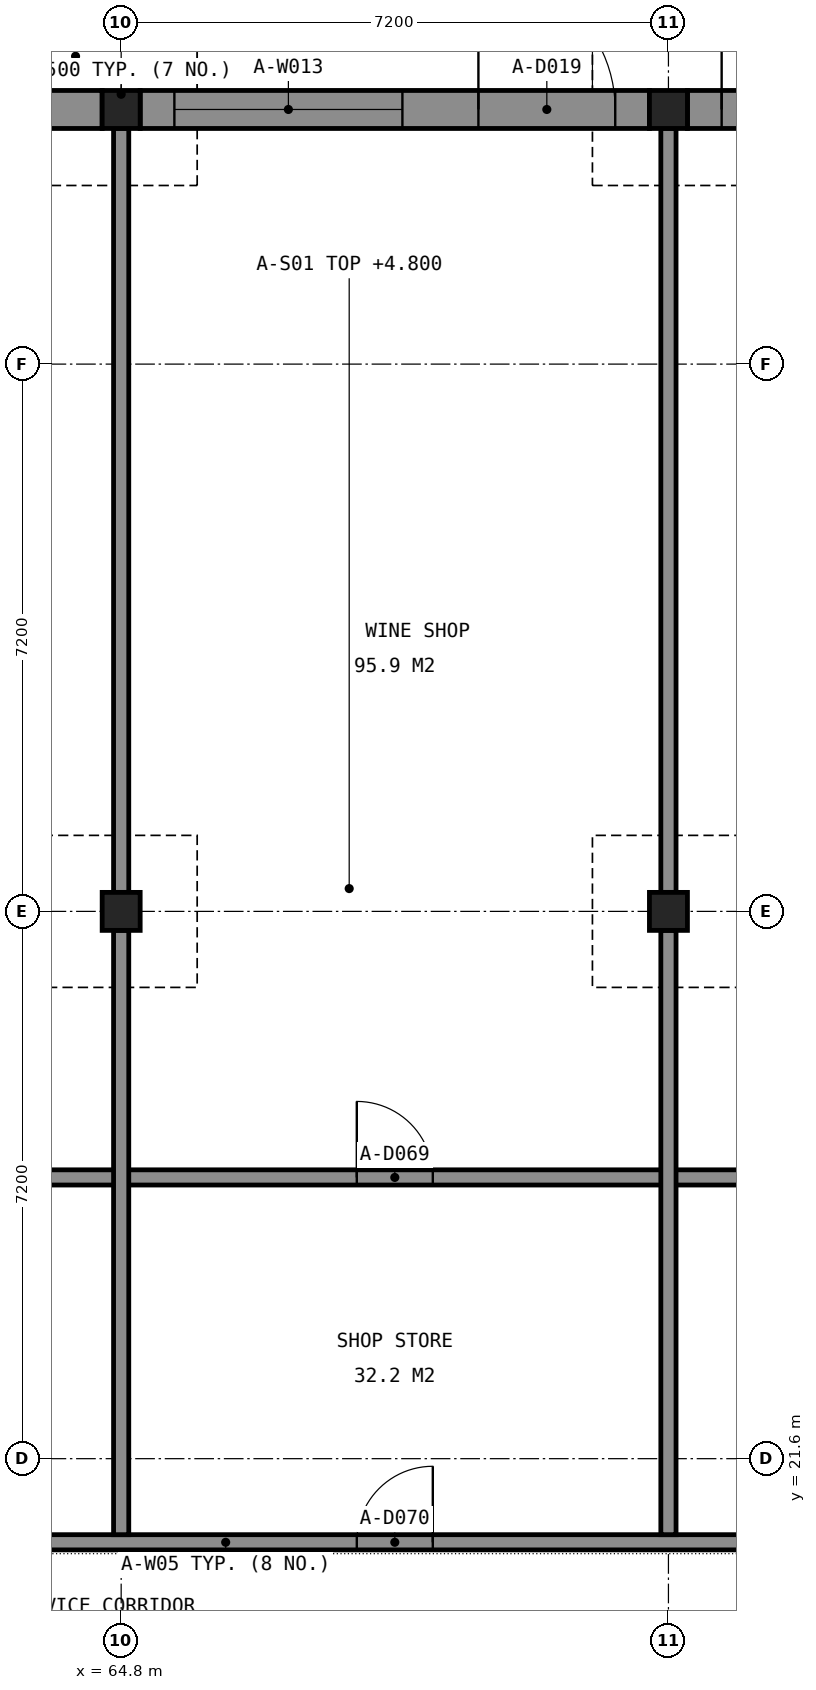
"""IFC4 building model, lengths in metres.
Left out: names, types, materials, properties, quantities, classifications, styles, units other than length and angle.
Written with IfcOpenShell. Run it as: python <this file> out.ifc"""

import sys

from ifc_helpers import new_model, si_unit, direction, frame, frame_2d, origin, origin_2d, place, context, subcontext, project, spatial, rectangle, extrude, element, fill, save


model = new_model("IFC4")
c1 = context("Model", 3, precision=1e-05, world=origin(), true_north=direction((0.0, 1.0)))
c2 = subcontext(c1, "Body", "Model", "MODEL_VIEW")
j1 = project(units=[si_unit("LENGTHUNIT", "METRE"), si_unit("PLANEANGLEUNIT", "RADIAN")], contexts=[c1])
p1 = place(None, origin())
s1 = spatial("IfcSite", under=j1, at=p1, CompositionType="ELEMENT")
p2 = place(p1, origin())
s2 = spatial("IfcBuilding", under=s1, at=p2, CompositionType="ELEMENT")
p3 = place(p2, origin())
s3 = spatial("IfcBuildingStorey", under=s2, at=p3, CompositionType="ELEMENT", Elevation=0.0)
for number, where, z_axis, x_axis in (
    (1, (64.8, 39.35, 0.0), (0.0, 0.0, 1.0), (1.0, 0.0, 0.0)),
    (2, (72.0, 39.35, 0.0), (0.0, 0.0, 1.0), (1.0, 0.0, 0.0)),
    (3, (64.8, 28.8, 0.0), (0.0, 0.0, 1.0), (1.0, 0.0, 0.0)),
    (4, (72.0, 28.8, 0.0), (0.0, 0.0, 1.0), (1.0, 0.0, 0.0)),
):
    element("IfcColumn", number, at=place(p3, frame(where, z_axis=z_axis, x_axis=x_axis)), inside=s3, PredefinedType="COLUMN", context=c2, shape_type="SweptSolid", body=[
        extrude(rectangle(XDim=0.5, YDim=0.5, at=origin_2d()), origin(), (0.0, 0.0, 1.0), 3.7),
    ])
p4 = place(p3, frame((57.85, 39.35, 0.0), z_axis=(0.0, 0.0, 1.0), x_axis=(1.0, 0.0, 0.0)))
e5 = element("IfcWall", 5, at=p4, inside=s3, PredefinedType="SOLIDWALL", context=c2, shape_type="SweptSolid", body=[
    extrude(rectangle(XDim=6.7, YDim=0.5, at=frame_2d((3.35, 0.0))), origin(), (0.0, 0.0, 1.0), 3.6),
])
p5 = place(p4, frame((0.45, 0.0, 0.0)))
e6 = element("IfcOpeningElement", 6, at=p5, cuts=e5, PredefinedType="OPENING", context=c2, shape_type="SweptSolid", body=[
    extrude(rectangle(XDim=1.8, YDim=2.4, at=frame_2d((0.9, 1.2))), frame((0.0, 0.26, 0.0), z_axis=(0.0, -1.0, 0.0), x_axis=(1.0, 0.0, 0.0)), (0.0, 0.0, 1.0), 0.52),
])
p6 = place(p4, frame((2.6, 0.0, 0.6)))
e7 = element("IfcOpeningElement", 7, at=p6, cuts=e5, PredefinedType="OPENING", context=c2, shape_type="SweptSolid", body=[
    extrude(rectangle(XDim=3.0, YDim=2.4, at=frame_2d((1.5, 1.2))), frame((0.0, 0.26, 0.0), z_axis=(0.0, -1.0, 0.0), x_axis=(1.0, 0.0, 0.0)), (0.0, 0.0, 1.0), 0.52),
])
p7 = place(p3, frame((65.05, 39.35, 0.0), z_axis=(0.0, 0.0, 1.0), x_axis=(1.0, 0.0, 0.0)))
e8 = element("IfcWall", 8, at=p7, inside=s3, PredefinedType="SOLIDWALL", context=c2, shape_type="SweptSolid", body=[
    extrude(rectangle(XDim=6.7, YDim=0.5, at=frame_2d((3.35, 0.0))), origin(), (0.0, 0.0, 1.0), 3.6),
])
p8 = place(p7, frame((4.45, 0.0, 0.0)))
e9 = element("IfcOpeningElement", 9, at=p8, cuts=e8, PredefinedType="OPENING", context=c2, shape_type="SweptSolid", body=[
    extrude(rectangle(XDim=1.8, YDim=2.4, at=frame_2d((0.9, 1.2))), frame((0.0, 0.26, 0.0), z_axis=(0.0, -1.0, 0.0), x_axis=(1.0, 0.0, 0.0)), (0.0, 0.0, 1.0), 0.52),
])
p9 = place(p7, frame((0.45, 0.0, 0.6)))
e10 = element("IfcOpeningElement", 10, at=p9, cuts=e8, PredefinedType="OPENING", context=c2, shape_type="SweptSolid", body=[
    extrude(rectangle(XDim=3.0, YDim=2.4, at=frame_2d((1.5, 1.2))), frame((0.0, 0.26, 0.0), z_axis=(0.0, -1.0, 0.0), x_axis=(1.0, 0.0, 0.0)), (0.0, 0.0, 1.0), 0.52),
])
p10 = place(p3, frame((72.25, 39.35, 0.0), z_axis=(0.0, 0.0, 1.0), x_axis=(1.0, 0.0, 0.0)))
e11 = element("IfcWall", 11, at=p10, inside=s3, PredefinedType="SOLIDWALL", context=c2, shape_type="SweptSolid", body=[
    extrude(rectangle(XDim=6.7, YDim=0.5, at=frame_2d((3.35, 0.0))), origin(), (0.0, 0.0, 1.0), 3.6),
])
p11 = place(p10, frame((0.45, 0.0, 0.0)))
e12 = element("IfcOpeningElement", 12, at=p11, cuts=e11, PredefinedType="OPENING", context=c2, shape_type="SweptSolid", body=[
    extrude(rectangle(XDim=1.8, YDim=2.4, at=frame_2d((0.9, 1.2))), frame((0.0, 0.26, 0.0), z_axis=(0.0, -1.0, 0.0), x_axis=(1.0, 0.0, 0.0)), (0.0, 0.0, 1.0), 0.52),
])
p12 = place(p10, frame((2.6, 0.0, 0.6)))
e13 = element("IfcOpeningElement", 13, at=p12, cuts=e11, PredefinedType="OPENING", context=c2, shape_type="SweptSolid", body=[
    extrude(rectangle(XDim=3.0, YDim=2.4, at=frame_2d((1.5, 1.2))), frame((0.0, 0.26, 0.0), z_axis=(0.0, -1.0, 0.0), x_axis=(1.0, 0.0, 0.0)), (0.0, 0.0, 1.0), 0.52),
])
p13 = place(p3, frame((54.35, 20.5, 0.0), z_axis=(0.0, 0.0, 1.0), x_axis=(1.0, 0.0, 0.0)))
e14 = element("IfcWall", 14, at=p13, inside=s3, PredefinedType="PARTITIONING", context=c2, shape_type="SweptSolid", body=[
    extrude(rectangle(XDim=92.9, YDim=0.2, at=frame_2d((46.45, 0.0))), origin(), (0.0, 0.0, 1.0), 3.5),
])
p14 = place(p13, frame((1.1, 0.0, 0.0)))
e15 = element("IfcOpeningElement", 15, at=p14, cuts=e14, PredefinedType="OPENING", context=c2, shape_type="SweptSolid", body=[
    extrude(rectangle(XDim=0.9, YDim=2.1, at=frame_2d((0.45, 1.05))), frame((0.0, 0.11, 0.0), z_axis=(0.0, -1.0, 0.0), x_axis=(1.0, 0.0, 0.0)), (0.0, 0.0, 1.0), 0.22),
])
p15 = place(p13, frame((90.9, 0.0, 0.0)))
e16 = element("IfcOpeningElement", 16, at=p15, cuts=e14, PredefinedType="OPENING", context=c2, shape_type="SweptSolid", body=[
    extrude(rectangle(XDim=0.9, YDim=2.1, at=frame_2d((0.45, 1.05))), frame((0.0, 0.11, 0.0), z_axis=(0.0, -1.0, 0.0), x_axis=(1.0, 0.0, 0.0)), (0.0, 0.0, 1.0), 0.22),
])
p16 = place(p13, frame((6.35, 0.0, 0.0)))
e17 = element("IfcOpeningElement", 17, at=p16, cuts=e14, PredefinedType="OPENING", context=c2, shape_type="SweptSolid", body=[
    extrude(rectangle(XDim=1.0, YDim=2.1, at=frame_2d((0.5, 1.05))), frame((0.0, 0.11, 0.0), z_axis=(0.0, -1.0, 0.0), x_axis=(1.0, 0.0, 0.0)), (0.0, 0.0, 1.0), 0.22),
])
p17 = place(p13, frame((13.55, 0.0, 0.0)))
e18 = element("IfcOpeningElement", 18, at=p17, cuts=e14, PredefinedType="OPENING", context=c2, shape_type="SweptSolid", body=[
    extrude(rectangle(XDim=1.0, YDim=2.1, at=frame_2d((0.5, 1.05))), frame((0.0, 0.11, 0.0), z_axis=(0.0, -1.0, 0.0), x_axis=(1.0, 0.0, 0.0)), (0.0, 0.0, 1.0), 0.22),
])
p18 = place(p13, frame((20.75, 0.0, 0.0)))
e19 = element("IfcOpeningElement", 19, at=p18, cuts=e14, PredefinedType="OPENING", context=c2, shape_type="SweptSolid", body=[
    extrude(rectangle(XDim=1.0, YDim=2.1, at=frame_2d((0.5, 1.05))), frame((0.0, 0.11, 0.0), z_axis=(0.0, -1.0, 0.0), x_axis=(1.0, 0.0, 0.0)), (0.0, 0.0, 1.0), 0.22),
])
p19 = place(p13, frame((27.95, 0.0, 0.0)))
e20 = element("IfcOpeningElement", 20, at=p19, cuts=e14, PredefinedType="OPENING", context=c2, shape_type="SweptSolid", body=[
    extrude(rectangle(XDim=1.0, YDim=2.1, at=frame_2d((0.5, 1.05))), frame((0.0, 0.11, 0.0), z_axis=(0.0, -1.0, 0.0), x_axis=(1.0, 0.0, 0.0)), (0.0, 0.0, 1.0), 0.22),
])
p20 = place(p13, frame((35.15, 0.0, 0.0)))
e21 = element("IfcOpeningElement", 21, at=p20, cuts=e14, PredefinedType="OPENING", context=c2, shape_type="SweptSolid", body=[
    extrude(rectangle(XDim=1.0, YDim=2.1, at=frame_2d((0.5, 1.05))), frame((0.0, 0.11, 0.0), z_axis=(0.0, -1.0, 0.0), x_axis=(1.0, 0.0, 0.0)), (0.0, 0.0, 1.0), 0.22),
])
p21 = place(p13, frame((42.35, 0.0, 0.0)))
e22 = element("IfcOpeningElement", 22, at=p21, cuts=e14, PredefinedType="OPENING", context=c2, shape_type="SweptSolid", body=[
    extrude(rectangle(XDim=1.0, YDim=2.1, at=frame_2d((0.5, 1.05))), frame((0.0, 0.11, 0.0), z_axis=(0.0, -1.0, 0.0), x_axis=(1.0, 0.0, 0.0)), (0.0, 0.0, 1.0), 0.22),
])
p22 = place(p13, frame((49.55, 0.0, 0.0)))
e23 = element("IfcOpeningElement", 23, at=p22, cuts=e14, PredefinedType="OPENING", context=c2, shape_type="SweptSolid", body=[
    extrude(rectangle(XDim=1.0, YDim=2.1, at=frame_2d((0.5, 1.05))), frame((0.0, 0.11, 0.0), z_axis=(0.0, -1.0, 0.0), x_axis=(1.0, 0.0, 0.0)), (0.0, 0.0, 1.0), 0.22),
])
p23 = place(p13, frame((56.75, 0.0, 0.0)))
e24 = element("IfcOpeningElement", 24, at=p23, cuts=e14, PredefinedType="OPENING", context=c2, shape_type="SweptSolid", body=[
    extrude(rectangle(XDim=1.0, YDim=2.1, at=frame_2d((0.5, 1.05))), frame((0.0, 0.11, 0.0), z_axis=(0.0, -1.0, 0.0), x_axis=(1.0, 0.0, 0.0)), (0.0, 0.0, 1.0), 0.22),
])
p24 = place(p13, frame((63.95, 0.0, 0.0)))
e25 = element("IfcOpeningElement", 25, at=p24, cuts=e14, PredefinedType="OPENING", context=c2, shape_type="SweptSolid", body=[
    extrude(rectangle(XDim=1.0, YDim=2.1, at=frame_2d((0.5, 1.05))), frame((0.0, 0.11, 0.0), z_axis=(0.0, -1.0, 0.0), x_axis=(1.0, 0.0, 0.0)), (0.0, 0.0, 1.0), 0.22),
])
p25 = place(p13, frame((71.15, 0.0, 0.0)))
e26 = element("IfcOpeningElement", 26, at=p25, cuts=e14, PredefinedType="OPENING", context=c2, shape_type="SweptSolid", body=[
    extrude(rectangle(XDim=1.0, YDim=2.1, at=frame_2d((0.5, 1.05))), frame((0.0, 0.11, 0.0), z_axis=(0.0, -1.0, 0.0), x_axis=(1.0, 0.0, 0.0)), (0.0, 0.0, 1.0), 0.22),
])
p26 = place(p13, frame((78.35, 0.0, 0.0)))
e27 = element("IfcOpeningElement", 27, at=p26, cuts=e14, PredefinedType="OPENING", context=c2, shape_type="SweptSolid", body=[
    extrude(rectangle(XDim=1.0, YDim=2.1, at=frame_2d((0.5, 1.05))), frame((0.0, 0.11, 0.0), z_axis=(0.0, -1.0, 0.0), x_axis=(1.0, 0.0, 0.0)), (0.0, 0.0, 1.0), 0.22),
])
p27 = place(p13, frame((85.55, 0.0, 0.0)))
e28 = element("IfcOpeningElement", 28, at=p27, cuts=e14, PredefinedType="OPENING", context=c2, shape_type="SweptSolid", body=[
    extrude(rectangle(XDim=1.0, YDim=2.1, at=frame_2d((0.5, 1.05))), frame((0.0, 0.11, 0.0), z_axis=(0.0, -1.0, 0.0), x_axis=(1.0, 0.0, 0.0)), (0.0, 0.0, 1.0), 0.22),
])
p28 = place(p3, frame((57.7, 25.3, 0.0), z_axis=(0.0, 0.0, 1.0), x_axis=(1.0, 0.0, 0.0)))
e29 = element("IfcWall", 29, at=p28, inside=s3, PredefinedType="PARTITIONING", context=c2, shape_type="SweptSolid", body=[
    extrude(rectangle(XDim=86.2, YDim=0.2, at=frame_2d((43.1, 0.0))), origin(), (0.0, 0.0, 1.0), 3.5),
])
p29 = place(p28, frame((3.0, 0.0, 0.0)))
e30 = element("IfcOpeningElement", 30, at=p29, cuts=e29, PredefinedType="OPENING", context=c2, shape_type="SweptSolid", body=[
    extrude(rectangle(XDim=1.0, YDim=2.1, at=frame_2d((0.5, 1.05))), frame((0.0, 0.11, 0.0), z_axis=(0.0, -1.0, 0.0), x_axis=(1.0, 0.0, 0.0)), (0.0, 0.0, 1.0), 0.22),
])
p30 = place(p28, frame((10.2, 0.0, 0.0)))
e31 = element("IfcOpeningElement", 31, at=p30, cuts=e29, PredefinedType="OPENING", context=c2, shape_type="SweptSolid", body=[
    extrude(rectangle(XDim=1.0, YDim=2.1, at=frame_2d((0.5, 1.05))), frame((0.0, 0.11, 0.0), z_axis=(0.0, -1.0, 0.0), x_axis=(1.0, 0.0, 0.0)), (0.0, 0.0, 1.0), 0.22),
])
p31 = place(p28, frame((17.4, 0.0, 0.0)))
e32 = element("IfcOpeningElement", 32, at=p31, cuts=e29, PredefinedType="OPENING", context=c2, shape_type="SweptSolid", body=[
    extrude(rectangle(XDim=1.0, YDim=2.1, at=frame_2d((0.5, 1.05))), frame((0.0, 0.11, 0.0), z_axis=(0.0, -1.0, 0.0), x_axis=(1.0, 0.0, 0.0)), (0.0, 0.0, 1.0), 0.22),
])
p32 = place(p28, frame((24.6, 0.0, 0.0)))
e33 = element("IfcOpeningElement", 33, at=p32, cuts=e29, PredefinedType="OPENING", context=c2, shape_type="SweptSolid", body=[
    extrude(rectangle(XDim=1.0, YDim=2.1, at=frame_2d((0.5, 1.05))), frame((0.0, 0.11, 0.0), z_axis=(0.0, -1.0, 0.0), x_axis=(1.0, 0.0, 0.0)), (0.0, 0.0, 1.0), 0.22),
])
p33 = place(p28, frame((31.8, 0.0, 0.0)))
e34 = element("IfcOpeningElement", 34, at=p33, cuts=e29, PredefinedType="OPENING", context=c2, shape_type="SweptSolid", body=[
    extrude(rectangle(XDim=1.0, YDim=2.1, at=frame_2d((0.5, 1.05))), frame((0.0, 0.11, 0.0), z_axis=(0.0, -1.0, 0.0), x_axis=(1.0, 0.0, 0.0)), (0.0, 0.0, 1.0), 0.22),
])
p34 = place(p28, frame((39.0, 0.0, 0.0)))
e35 = element("IfcOpeningElement", 35, at=p34, cuts=e29, PredefinedType="OPENING", context=c2, shape_type="SweptSolid", body=[
    extrude(rectangle(XDim=1.0, YDim=2.1, at=frame_2d((0.5, 1.05))), frame((0.0, 0.11, 0.0), z_axis=(0.0, -1.0, 0.0), x_axis=(1.0, 0.0, 0.0)), (0.0, 0.0, 1.0), 0.22),
])
p35 = place(p28, frame((46.2, 0.0, 0.0)))
e36 = element("IfcOpeningElement", 36, at=p35, cuts=e29, PredefinedType="OPENING", context=c2, shape_type="SweptSolid", body=[
    extrude(rectangle(XDim=1.0, YDim=2.1, at=frame_2d((0.5, 1.05))), frame((0.0, 0.11, 0.0), z_axis=(0.0, -1.0, 0.0), x_axis=(1.0, 0.0, 0.0)), (0.0, 0.0, 1.0), 0.22),
])
p36 = place(p28, frame((53.4, 0.0, 0.0)))
e37 = element("IfcOpeningElement", 37, at=p36, cuts=e29, PredefinedType="OPENING", context=c2, shape_type="SweptSolid", body=[
    extrude(rectangle(XDim=1.0, YDim=2.1, at=frame_2d((0.5, 1.05))), frame((0.0, 0.11, 0.0), z_axis=(0.0, -1.0, 0.0), x_axis=(1.0, 0.0, 0.0)), (0.0, 0.0, 1.0), 0.22),
])
p37 = place(p28, frame((60.6, 0.0, 0.0)))
e38 = element("IfcOpeningElement", 38, at=p37, cuts=e29, PredefinedType="OPENING", context=c2, shape_type="SweptSolid", body=[
    extrude(rectangle(XDim=1.0, YDim=2.1, at=frame_2d((0.5, 1.05))), frame((0.0, 0.11, 0.0), z_axis=(0.0, -1.0, 0.0), x_axis=(1.0, 0.0, 0.0)), (0.0, 0.0, 1.0), 0.22),
])
p38 = place(p28, frame((67.8, 0.0, 0.0)))
e39 = element("IfcOpeningElement", 39, at=p38, cuts=e29, PredefinedType="OPENING", context=c2, shape_type="SweptSolid", body=[
    extrude(rectangle(XDim=1.0, YDim=2.1, at=frame_2d((0.5, 1.05))), frame((0.0, 0.11, 0.0), z_axis=(0.0, -1.0, 0.0), x_axis=(1.0, 0.0, 0.0)), (0.0, 0.0, 1.0), 0.22),
])
p39 = place(p28, frame((75.0, 0.0, 0.0)))
e40 = element("IfcOpeningElement", 40, at=p39, cuts=e29, PredefinedType="OPENING", context=c2, shape_type="SweptSolid", body=[
    extrude(rectangle(XDim=1.0, YDim=2.1, at=frame_2d((0.5, 1.05))), frame((0.0, 0.11, 0.0), z_axis=(0.0, -1.0, 0.0), x_axis=(1.0, 0.0, 0.0)), (0.0, 0.0, 1.0), 0.22),
])
p40 = place(p28, frame((84.65, 0.0, 0.0)))
e41 = element("IfcOpeningElement", 41, at=p40, cuts=e29, PredefinedType="OPENING", context=c2, shape_type="SweptSolid", body=[
    extrude(rectangle(XDim=0.9, YDim=2.1, at=frame_2d((0.45, 1.05))), frame((0.0, 0.11, 0.0), z_axis=(0.0, -1.0, 0.0), x_axis=(1.0, 0.0, 0.0)), (0.0, 0.0, 1.0), 0.22),
])
p41 = place(p3, frame((64.8, 20.6, 0.0), z_axis=(0.0, 0.0, 1.0), x_axis=(0.0, 1.0, 0.0)))
e42 = element("IfcWall", 42, at=p41, inside=s3, PredefinedType="PARTITIONING", context=c2, shape_type="SweptSolid", body=[
    extrude(rectangle(XDim=7.95, YDim=0.2, at=frame_2d((3.975, 0.0))), origin(), (0.0, 0.0, 1.0), 3.5),
])
p42 = place(p3, frame((64.8, 29.05, 0.0), z_axis=(0.0, 0.0, 1.0), x_axis=(0.0, 1.0, 0.0)))
e43 = element("IfcWall", 43, at=p42, inside=s3, PredefinedType="PARTITIONING", context=c2, shape_type="SweptSolid", body=[
    extrude(rectangle(XDim=10.05, YDim=0.2, at=frame_2d((5.025, 0.0))), origin(), (0.0, 0.0, 1.0), 3.5),
])
p43 = place(p3, frame((72.0, 20.6, 0.0), z_axis=(0.0, 0.0, 1.0), x_axis=(0.0, 1.0, 0.0)))
e44 = element("IfcWall", 44, at=p43, inside=s3, PredefinedType="PARTITIONING", context=c2, shape_type="SweptSolid", body=[
    extrude(rectangle(XDim=7.95, YDim=0.2, at=frame_2d((3.975, 0.0))), origin(), (0.0, 0.0, 1.0), 3.5),
])
p44 = place(p3, frame((72.0, 29.05, 0.0), z_axis=(0.0, 0.0, 1.0), x_axis=(0.0, 1.0, 0.0)))
e45 = element("IfcWall", 45, at=p44, inside=s3, PredefinedType="PARTITIONING", context=c2, shape_type="SweptSolid", body=[
    extrude(rectangle(XDim=10.05, YDim=0.2, at=frame_2d((5.025, 0.0))), origin(), (0.0, 0.0, 1.0), 3.5),
])
p45 = place(p8, origin())
e46 = element("IfcDoor", 46, at=p45, inside=s3, OperationType="DOUBLE_DOOR_DOUBLE_SWING", PredefinedType="DOOR", context=c2, shape_type="SweptSolid", body=[
    extrude(rectangle(XDim=1.8, YDim=2.4, at=frame_2d((0.9, 1.2))), frame((0.0, 0.025, 0.0), z_axis=(0.0, -1.0, 0.0), x_axis=(1.0, 0.0, 0.0)), (0.0, 0.0, 1.0), 0.05),
])
fill(e9, e46)
p46 = place(p9, origin())
e47 = element("IfcWindow", 47, at=p46, inside=s3, PartitioningType="SINGLE_PANEL", PredefinedType="WINDOW", context=c2, shape_type="SweptSolid", body=[
    extrude(rectangle(XDim=3.0, YDim=2.4, at=frame_2d((1.5, 1.2))), frame((0.0, 0.03, 0.0), z_axis=(0.0, -1.0, 0.0), x_axis=(1.0, 0.0, 0.0)), (0.0, 0.0, 1.0), 0.06),
])
fill(e10, e47)
p47 = place(p11, origin())
e48 = element("IfcDoor", 48, at=p47, inside=s3, OperationType="DOUBLE_DOOR_DOUBLE_SWING", PredefinedType="DOOR", context=c2, shape_type="SweptSolid", body=[
    extrude(rectangle(XDim=1.8, YDim=2.4, at=frame_2d((0.9, 1.2))), frame((0.0, 0.025, 0.0), z_axis=(0.0, -1.0, 0.0), x_axis=(1.0, 0.0, 0.0)), (0.0, 0.0, 1.0), 0.05),
])
fill(e12, e48)
p48 = place(p30, origin())
e49 = element("IfcDoor", 49, at=p48, inside=s3, OperationType="SINGLE_SWING_LEFT", PredefinedType="DOOR", context=c2, shape_type="SweptSolid", body=[
    extrude(rectangle(XDim=1.0, YDim=2.1, at=frame_2d((0.5, 1.05))), frame((0.0, 0.025, 0.0), z_axis=(0.0, -1.0, 0.0), x_axis=(1.0, 0.0, 0.0)), (0.0, 0.0, 1.0), 0.05),
])
fill(e31, e49)
p49 = place(p17, origin())
e50 = element("IfcDoor", 50, at=p49, inside=s3, OperationType="SINGLE_SWING_RIGHT", PredefinedType="DOOR", context=c2, shape_type="SweptSolid", body=[
    extrude(rectangle(XDim=1.0, YDim=2.1, at=frame_2d((0.5, 1.05))), frame((0.0, 0.025, 0.0), z_axis=(0.0, -1.0, 0.0), x_axis=(1.0, 0.0, 0.0)), (0.0, 0.0, 1.0), 0.05),
])
fill(e18, e50)
save(model, sys.argv[1])
